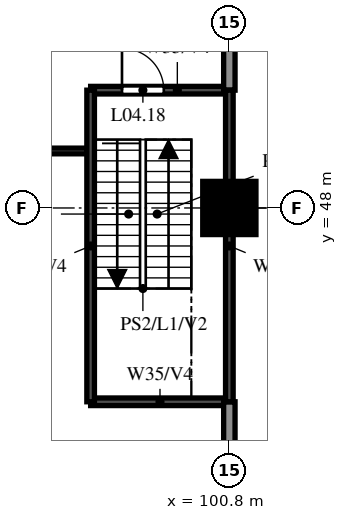
"""IFC4 building model, lengths in metres.
Left out: names, types, materials, properties, quantities, classifications, styles, units other than length and angle.
Written with IfcOpenShell. Run it as: python <this file> out.ifc"""

import sys

from ifc_helpers import new_model, si_unit, direction, frame, frame_2d, origin, origin_2d, place, context, subcontext, project, spatial, rectangle, circle, extrude, source, transform, mapped, element, fill, save


model = new_model("IFC4")
c1 = context("Model", 3, precision=1e-05, world=origin(), true_north=direction((0.0, 1.0)))
c2 = subcontext(c1, "Body", "Model", "MODEL_VIEW")
j1 = project(units=[si_unit("LENGTHUNIT", "METRE"), si_unit("PLANEANGLEUNIT", "RADIAN")], contexts=[c1])
p1 = place(None, origin())
s1 = spatial("IfcSite", under=j1, at=p1, CompositionType="ELEMENT")
p2 = place(p1, origin())
s2 = spatial("IfcBuilding", under=s1, at=p2, CompositionType="ELEMENT")
p3 = place(p2, frame((0.0, 0.0, 21.6)))
s3 = spatial("IfcBuildingStorey", under=s2, at=p3, CompositionType="ELEMENT", Elevation=21.6)
m1 = source(origin(), c2, "Body", "SweptSolid", [
    extrude(circle(Radius=0.7, at=origin_2d()), origin(), (0.0, 0.0, 1.0), 4.95),
])
p4 = place(p3, frame((100.8, 48.0, 0.0), z_axis=(0.0, 0.0, 1.0), x_axis=(1.0, 0.0, 0.0)))
e1 = element("IfcColumn", 1, at=p4, inside=s3, PredefinedType="COLUMN", context=c2, shape_type="MappedRepresentation", body=[
    mapped(m1, transform((0.0, 0.0, 0.0))),
])
p5 = place(p3, frame((97.15, 42.9, 0.0), z_axis=(0.0, 0.0, 1.0), x_axis=(1.0, 0.0, 0.0)))
e2 = element("IfcWall", 2, at=p5, inside=s3, PredefinedType="SOLIDWALL", context=c2, shape_type="SweptSolid", body=[
    extrude(rectangle(XDim=3.65, YDim=0.2, at=frame_2d((1.825, 0.0))), origin(), (0.0, 0.0, 1.0), 4.95),
])
p6 = place(p3, frame((3.75, 49.5, 0.0), z_axis=(0.0, 0.0, 1.0), x_axis=(1.0, 0.0, 0.0)))
e3 = element("IfcWall", 3, at=p6, inside=s3, PredefinedType="PARTITIONING", context=c2, shape_type="SweptSolid", body=[
    extrude(rectangle(XDim=93.3, YDim=0.15, at=frame_2d((46.65, 0.0))), origin(), (0.0, 0.0, 1.0), 3.45),
])
p7 = place(p6, frame((15.175, 0.0, 0.0)))
e4 = element("IfcOpeningElement", 4, at=p7, cuts=e3, PredefinedType="OPENING", context=c2, shape_type="SweptSolid", body=[
    extrude(rectangle(XDim=1.8, YDim=2.1, at=frame_2d((0.9, 1.05))), frame((0.0, 0.085, 0.0), z_axis=(0.0, -1.0, 0.0), x_axis=(1.0, 0.0, 0.0)), (0.0, 0.0, 1.0), 0.17),
])
p8 = place(p6, frame((4.823, 0.0, 0.0)))
e5 = element("IfcOpeningElement", 5, at=p8, cuts=e3, PredefinedType="OPENING", context=c2, shape_type="SweptSolid", body=[
    extrude(rectangle(XDim=1.8, YDim=2.1, at=frame_2d((0.9, 1.05))), frame((0.0, 0.085, 0.0), z_axis=(0.0, -1.0, 0.0), x_axis=(1.0, 0.0, 0.0)), (0.0, 0.0, 1.0), 0.17),
])
p9 = place(p6, frame((44.05, 0.0, 0.0)))
e6 = element("IfcOpeningElement", 6, at=p9, cuts=e3, PredefinedType="OPENING", context=c2, shape_type="SweptSolid", body=[
    extrude(rectangle(XDim=1.8, YDim=2.1, at=frame_2d((0.9, 1.05))), frame((0.0, 0.085, 0.0), z_axis=(0.0, -1.0, 0.0), x_axis=(1.0, 0.0, 0.0)), (0.0, 0.0, 1.0), 0.17),
])
p10 = place(p6, frame((36.534, 0.0, 0.0)))
e7 = element("IfcOpeningElement", 7, at=p10, cuts=e3, PredefinedType="OPENING", context=c2, shape_type="SweptSolid", body=[
    extrude(rectangle(XDim=1.8, YDim=2.1, at=frame_2d((0.9, 1.05))), frame((0.0, 0.085, 0.0), z_axis=(0.0, -1.0, 0.0), x_axis=(1.0, 0.0, 0.0)), (0.0, 0.0, 1.0), 0.17),
])
p11 = place(p6, frame((76.325, 0.0, 0.0)))
e8 = element("IfcOpeningElement", 8, at=p11, cuts=e3, PredefinedType="OPENING", context=c2, shape_type="SweptSolid", body=[
    extrude(rectangle(XDim=1.8, YDim=2.1, at=frame_2d((0.9, 1.05))), frame((0.0, 0.085, 0.0), z_axis=(0.0, -1.0, 0.0), x_axis=(1.0, 0.0, 0.0)), (0.0, 0.0, 1.0), 0.17),
])
p12 = place(p6, frame((65.623, 0.0, 0.0)))
e9 = element("IfcOpeningElement", 9, at=p12, cuts=e3, PredefinedType="OPENING", context=c2, shape_type="SweptSolid", body=[
    extrude(rectangle(XDim=1.8, YDim=2.1, at=frame_2d((0.9, 1.05))), frame((0.0, 0.085, 0.0), z_axis=(0.0, -1.0, 0.0), x_axis=(1.0, 0.0, 0.0)), (0.0, 0.0, 1.0), 0.17),
])
p13 = place(p3, frame((97.15, 51.1, 0.0), z_axis=(0.0, 0.0, 1.0), x_axis=(1.0, 0.0, 0.0)))
e10 = element("IfcWall", 10, at=p13, inside=s3, PredefinedType="SOLIDWALL", context=c2, shape_type="SweptSolid", body=[
    extrude(rectangle(XDim=3.65, YDim=0.2, at=frame_2d((1.825, 0.0))), origin(), (0.0, 0.0, 1.0), 4.95),
])
p14 = place(p13, frame((0.825, 0.0, 0.0)))
e11 = element("IfcOpeningElement", 11, at=p14, cuts=e10, PredefinedType="OPENING", context=c2, shape_type="SweptSolid", body=[
    extrude(rectangle(XDim=1.1, YDim=2.1, at=frame_2d((0.55, 1.05))), frame((0.0, 0.11, 0.0), z_axis=(0.0, -1.0, 0.0), x_axis=(1.0, 0.0, 0.0)), (0.0, 0.0, 1.0), 0.22),
])
p15 = place(p3, frame((97.15, 42.9, 0.0), z_axis=(0.0, 0.0, 1.0), x_axis=(0.0, 1.0, 0.0)))
e12 = element("IfcWall", 12, at=p15, inside=s3, PredefinedType="SOLIDWALL", context=c2, shape_type="SweptSolid", body=[
    extrude(rectangle(XDim=8.2, YDim=0.2, at=frame_2d((4.1, 0.0))), origin(), (0.0, 0.0, 1.0), 4.95),
])
p16 = place(p3, frame((100.8, 19.2, 0.0), z_axis=(0.0, 0.0, 1.0), x_axis=(0.0, 1.0, 0.0)))
e13 = element("IfcWall", 13, at=p16, inside=s3, PredefinedType="SOLIDWALL", context=c2, shape_type="SweptSolid", body=[
    extrude(rectangle(XDim=23.7, YDim=0.3, at=frame_2d((11.85, 0.0))), origin(), (0.0, 0.0, 1.0), 4.95),
])
p17 = place(p16, frame((1.65, 0.0, 0.6)))
e14 = element("IfcOpeningElement", 14, at=p17, cuts=e13, PredefinedType="OPENING", context=c2, shape_type="SweptSolid", body=[
    extrude(rectangle(XDim=1.8, YDim=2.4, at=frame_2d((0.9, 1.2))), frame((0.0, 0.16, 0.0), z_axis=(0.0, -1.0, 0.0), x_axis=(1.0, 0.0, 0.0)), (0.0, 0.0, 1.0), 0.32),
])
p18 = place(p16, frame((5.25, 0.0, 0.6)))
e15 = element("IfcOpeningElement", 15, at=p18, cuts=e13, PredefinedType="OPENING", context=c2, shape_type="SweptSolid", body=[
    extrude(rectangle(XDim=1.8, YDim=2.4, at=frame_2d((0.9, 1.2))), frame((0.0, 0.16, 0.0), z_axis=(0.0, -1.0, 0.0), x_axis=(1.0, 0.0, 0.0)), (0.0, 0.0, 1.0), 0.32),
])
p19 = place(p16, frame((8.85, 0.0, 0.6)))
e16 = element("IfcOpeningElement", 16, at=p19, cuts=e13, PredefinedType="OPENING", context=c2, shape_type="SweptSolid", body=[
    extrude(rectangle(XDim=1.8, YDim=2.4, at=frame_2d((0.9, 1.2))), frame((0.0, 0.16, 0.0), z_axis=(0.0, -1.0, 0.0), x_axis=(1.0, 0.0, 0.0)), (0.0, 0.0, 1.0), 0.32),
])
p20 = place(p16, frame((16.05, 0.0, 0.6)))
e17 = element("IfcOpeningElement", 17, at=p20, cuts=e13, PredefinedType="OPENING", context=c2, shape_type="SweptSolid", body=[
    extrude(rectangle(XDim=1.8, YDim=2.4, at=frame_2d((0.9, 1.2))), frame((0.0, 0.16, 0.0), z_axis=(0.0, -1.0, 0.0), x_axis=(1.0, 0.0, 0.0)), (0.0, 0.0, 1.0), 0.32),
])
p21 = place(p16, frame((19.65, 0.0, 0.6)))
e18 = element("IfcOpeningElement", 18, at=p21, cuts=e13, PredefinedType="OPENING", context=c2, shape_type="SweptSolid", body=[
    extrude(rectangle(XDim=1.8, YDim=2.4, at=frame_2d((0.9, 1.2))), frame((0.0, 0.16, 0.0), z_axis=(0.0, -1.0, 0.0), x_axis=(1.0, 0.0, 0.0)), (0.0, 0.0, 1.0), 0.32),
])
p22 = place(p3, frame((100.8, 51.1, 0.0), z_axis=(0.0, 0.0, 1.0), x_axis=(0.0, 1.0, 0.0)))
e19 = element("IfcWall", 19, at=p22, inside=s3, PredefinedType="SOLIDWALL", context=c2, shape_type="SweptSolid", body=[
    extrude(rectangle(XDim=3.2, YDim=0.3, at=frame_2d((1.6, 0.0))), origin(), (0.0, 0.0, 1.0), 4.95),
])
p23 = place(p3, frame((100.8, 42.9, 0.0), z_axis=(0.0, 0.0, 1.0), x_axis=(0.0, 1.0, 0.0)))
e20 = element("IfcWall", 20, at=p23, inside=s3, PredefinedType="SOLIDWALL", context=c2, shape_type="SweptSolid", body=[
    extrude(rectangle(XDim=8.2, YDim=0.2, at=frame_2d((4.1, 0.0))), origin(), (0.0, 0.0, 1.0), 4.95),
])
p24 = place(p14, origin())
e21 = element("IfcDoor", 21, at=p24, inside=s3, OperationType="SINGLE_SWING_LEFT", PredefinedType="DOOR", context=c2, shape_type="SweptSolid", body=[
    extrude(rectangle(XDim=1.1, YDim=2.1, at=frame_2d((0.55, 1.05))), frame((0.0, 0.025, 0.0), z_axis=(0.0, -1.0, 0.0), x_axis=(1.0, 0.0, 0.0)), (0.0, 0.0, 1.0), 0.05),
])
fill(e11, e21)
save(model, sys.argv[1])
